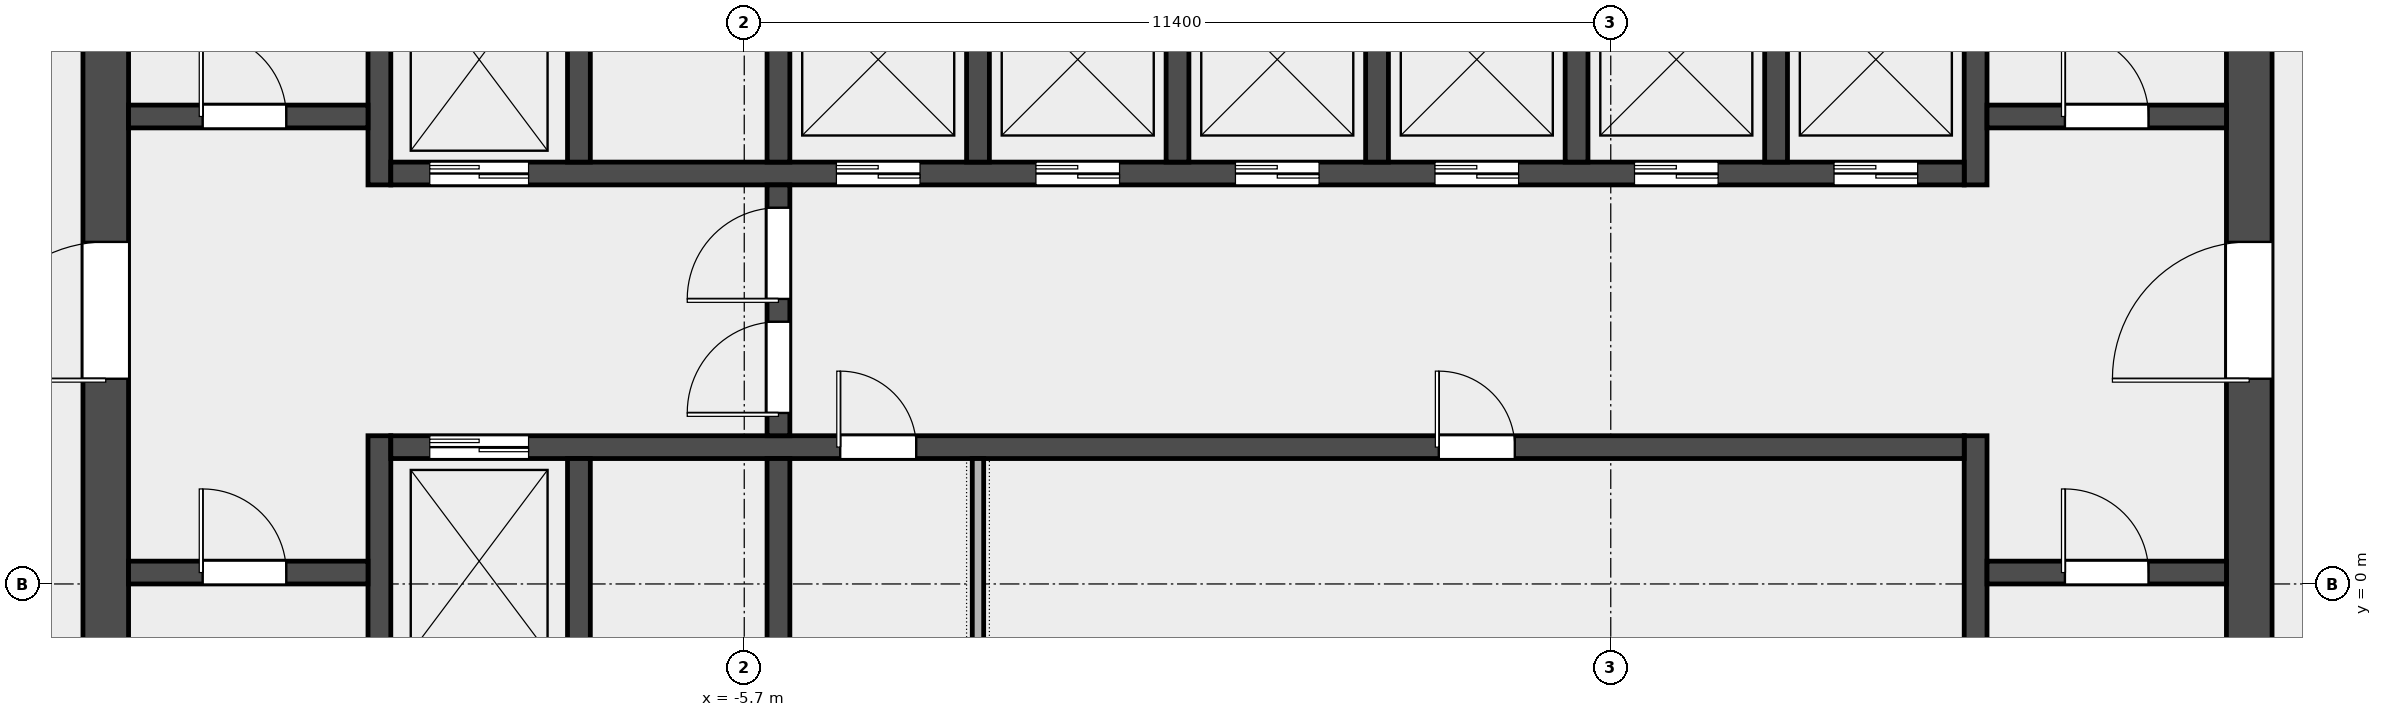
"""IFC4 building model, lengths in metres.
Left out: names, types, materials, properties, quantities, classifications, styles, units other than length and angle.
Written with IfcOpenShell. Run it as: python <this file> out.ifc"""

import sys

from ifc_helpers import new_model, si_unit, direction, frame, frame_2d, origin, place, context, subcontext, project, spatial, rectangle, extrude, element, fill, save


model = new_model("IFC4")
c1 = context("Model", 3, precision=1e-05, world=origin(), true_north=direction((0.0, 1.0)))
c2 = subcontext(c1, "Body", "Model", "MODEL_VIEW")
j1 = project(units=[si_unit("LENGTHUNIT", "METRE"), si_unit("PLANEANGLEUNIT", "RADIAN")], contexts=[c1])
p1 = place(None, origin())
s1 = spatial("IfcSite", under=j1, at=p1, CompositionType="ELEMENT")
p2 = place(p1, origin())
s2 = spatial("IfcBuilding", under=s1, at=p2, CompositionType="ELEMENT")
p3 = place(p2, frame((0.0, 0.0, 333.4)))
s3 = spatial("IfcBuildingStorey", under=s2, at=p3, CompositionType="ELEMENT", Elevation=333.4)
p4 = place(p3, frame((-14.1, -6.6, 0.0), z_axis=(0.0, 0.0, 1.0), x_axis=(0.0, 1.0, 0.0)))
e1 = element("IfcWall", 1, at=p4, inside=s3, PredefinedType="SHEAR", context=c2, shape_type="SweptSolid", body=[
    extrude(rectangle(XDim=19.5, YDim=0.6, at=frame_2d((9.75, 0.0))), origin(), (0.0, 0.0, 1.0), 3.7),
])
p5 = place(p4, frame((9.3, 0.0, 0.0)))
e2 = element("IfcOpeningElement", 2, at=p5, cuts=e1, PredefinedType="OPENING", context=c2, shape_type="SweptSolid", body=[
    extrude(rectangle(XDim=1.8, YDim=2.1, at=frame_2d((0.9, 1.05))), frame((0.0, 0.312, 0.0), z_axis=(0.0, -1.0, 0.0), x_axis=(1.0, 0.0, 0.0)), (0.0, 0.0, 1.0), 0.624),
])
p6 = place(p3, frame((14.1, -6.6, 0.0), z_axis=(0.0, 0.0, 1.0), x_axis=(0.0, 1.0, 0.0)))
e3 = element("IfcWall", 3, at=p6, inside=s3, PredefinedType="SHEAR", context=c2, shape_type="SweptSolid", body=[
    extrude(rectangle(XDim=19.5, YDim=0.6, at=frame_2d((9.75, 0.0))), origin(), (0.0, 0.0, 1.0), 3.7),
])
p7 = place(p6, frame((9.3, 0.0, 0.0)))
e4 = element("IfcOpeningElement", 4, at=p7, cuts=e3, PredefinedType="OPENING", context=c2, shape_type="SweptSolid", body=[
    extrude(rectangle(XDim=1.8, YDim=2.1, at=frame_2d((0.9, 1.05))), frame((0.0, 0.312, 0.0), z_axis=(0.0, -1.0, 0.0), x_axis=(1.0, 0.0, 0.0)), (0.0, 0.0, 1.0), 0.624),
])
p8 = place(p3, frame((-10.5, -6.6, 0.0), z_axis=(0.0, 0.0, 1.0), x_axis=(0.0, 1.0, 0.0)))
e5 = element("IfcWall", 5, at=p8, inside=s3, PredefinedType="SHEAR", context=c2, shape_type="SweptSolid", body=[
    extrude(rectangle(XDim=8.55, YDim=0.3, at=frame_2d((4.275, 0.0))), origin(), (0.0, 0.0, 1.0), 3.7),
])
p9 = place(p3, frame((-10.5, 5.25, 0.0), z_axis=(0.0, 0.0, 1.0), x_axis=(0.0, 1.0, 0.0)))
e6 = element("IfcWall", 6, at=p9, inside=s3, PredefinedType="SHEAR", context=c2, shape_type="SweptSolid", body=[
    extrude(rectangle(XDim=7.65, YDim=0.3, at=frame_2d((3.825, 0.0))), origin(), (0.0, 0.0, 1.0), 3.7),
])
p10 = place(p3, frame((10.5, -6.6, 0.0), z_axis=(0.0, 0.0, 1.0), x_axis=(0.0, 1.0, 0.0)))
e7 = element("IfcWall", 7, at=p10, inside=s3, PredefinedType="SHEAR", context=c2, shape_type="SweptSolid", body=[
    extrude(rectangle(XDim=8.55, YDim=0.3, at=frame_2d((4.275, 0.0))), origin(), (0.0, 0.0, 1.0), 3.7),
])
p11 = place(p3, frame((10.5, 5.25, 0.0), z_axis=(0.0, 0.0, 1.0), x_axis=(0.0, 1.0, 0.0)))
e8 = element("IfcWall", 8, at=p11, inside=s3, PredefinedType="SHEAR", context=c2, shape_type="SweptSolid", body=[
    extrude(rectangle(XDim=7.65, YDim=0.3, at=frame_2d((3.825, 0.0))), origin(), (0.0, 0.0, 1.0), 3.7),
])
p12 = place(p3, frame((-13.8, 0.15, 0.0), z_axis=(0.0, 0.0, 1.0), x_axis=(1.0, 0.0, 0.0)))
e9 = element("IfcWall", 9, at=p12, inside=s3, PredefinedType="SOLIDWALL", context=c2, shape_type="SweptSolid", body=[
    extrude(rectangle(XDim=3.15, YDim=0.3, at=frame_2d((1.575, 0.0))), origin(), (0.0, 0.0, 1.0), 3.7),
])
p13 = place(p12, frame((0.975, 0.0, 0.0)))
e10 = element("IfcOpeningElement", 10, at=p13, cuts=e9, PredefinedType="OPENING", context=c2, shape_type="SweptSolid", body=[
    extrude(rectangle(XDim=1.1, YDim=2.1, at=frame_2d((0.55, 1.05))), frame((0.0, 0.162, 0.0), z_axis=(0.0, -1.0, 0.0), x_axis=(1.0, 0.0, 0.0)), (0.0, 0.0, 1.0), 0.324),
])
p14 = place(p3, frame((-13.8, 6.15, 0.0), z_axis=(0.0, 0.0, 1.0), x_axis=(1.0, 0.0, 0.0)))
e11 = element("IfcWall", 11, at=p14, inside=s3, PredefinedType="SOLIDWALL", context=c2, shape_type="SweptSolid", body=[
    extrude(rectangle(XDim=3.15, YDim=0.3, at=frame_2d((1.575, 0.0))), origin(), (0.0, 0.0, 1.0), 3.7),
])
p15 = place(p14, frame((0.975, 0.0, 0.0)))
e12 = element("IfcOpeningElement", 12, at=p15, cuts=e11, PredefinedType="OPENING", context=c2, shape_type="SweptSolid", body=[
    extrude(rectangle(XDim=1.1, YDim=2.1, at=frame_2d((0.55, 1.05))), frame((0.0, 0.162, 0.0), z_axis=(0.0, -1.0, 0.0), x_axis=(1.0, 0.0, 0.0)), (0.0, 0.0, 1.0), 0.324),
])
p16 = place(p3, frame((10.65, 0.15, 0.0), z_axis=(0.0, 0.0, 1.0), x_axis=(1.0, 0.0, 0.0)))
e13 = element("IfcWall", 13, at=p16, inside=s3, PredefinedType="SOLIDWALL", context=c2, shape_type="SweptSolid", body=[
    extrude(rectangle(XDim=3.15, YDim=0.3, at=frame_2d((1.575, 0.0))), origin(), (0.0, 0.0, 1.0), 3.7),
])
p17 = place(p16, frame((1.025, 0.0, 0.0)))
e14 = element("IfcOpeningElement", 14, at=p17, cuts=e13, PredefinedType="OPENING", context=c2, shape_type="SweptSolid", body=[
    extrude(rectangle(XDim=1.1, YDim=2.1, at=frame_2d((0.55, 1.05))), frame((0.0, 0.162, 0.0), z_axis=(0.0, -1.0, 0.0), x_axis=(1.0, 0.0, 0.0)), (0.0, 0.0, 1.0), 0.324),
])
p18 = place(p3, frame((10.65, 6.15, 0.0), z_axis=(0.0, 0.0, 1.0), x_axis=(1.0, 0.0, 0.0)))
e15 = element("IfcWall", 15, at=p18, inside=s3, PredefinedType="SOLIDWALL", context=c2, shape_type="SweptSolid", body=[
    extrude(rectangle(XDim=3.15, YDim=0.3, at=frame_2d((1.575, 0.0))), origin(), (0.0, 0.0, 1.0), 3.7),
])
p19 = place(p18, frame((1.025, 0.0, 0.0)))
e16 = element("IfcOpeningElement", 16, at=p19, cuts=e15, PredefinedType="OPENING", context=c2, shape_type="SweptSolid", body=[
    extrude(rectangle(XDim=1.1, YDim=2.1, at=frame_2d((0.55, 1.05))), frame((0.0, 0.162, 0.0), z_axis=(0.0, -1.0, 0.0), x_axis=(1.0, 0.0, 0.0)), (0.0, 0.0, 1.0), 0.324),
])
p20 = place(p3, frame((-10.35, 1.8, 0.0), z_axis=(0.0, 0.0, 1.0), x_axis=(1.0, 0.0, 0.0)))
e17 = element("IfcWall", 17, at=p20, inside=s3, PredefinedType="SOLIDWALL", context=c2, shape_type="SweptSolid", body=[
    extrude(rectangle(XDim=20.7, YDim=0.3, at=frame_2d((10.35, 0.0))), origin(), (0.0, 0.0, 1.0), 3.7),
])
p21 = place(p20, frame((0.512, 0.0, 0.0)))
e18 = element("IfcOpeningElement", 18, at=p21, cuts=e17, PredefinedType="OPENING", context=c2, shape_type="SweptSolid", body=[
    extrude(rectangle(XDim=1.3, YDim=2.1, at=frame_2d((0.65, 1.05))), frame((0.0, 0.162, 0.0), z_axis=(0.0, -1.0, 0.0), x_axis=(1.0, 0.0, 0.0)), (0.0, 0.0, 1.0), 0.324),
])
p22 = place(p20, frame((5.913, 0.0, 0.0)))
e19 = element("IfcOpeningElement", 19, at=p22, cuts=e17, PredefinedType="OPENING", context=c2, shape_type="SweptSolid", body=[
    extrude(rectangle(XDim=1.0, YDim=2.1, at=frame_2d((0.5, 1.05))), frame((0.0, 0.162, 0.0), z_axis=(0.0, -1.0, 0.0), x_axis=(1.0, 0.0, 0.0)), (0.0, 0.0, 1.0), 0.324),
])
p23 = place(p20, frame((13.788, 0.0, 0.0)))
e20 = element("IfcOpeningElement", 20, at=p23, cuts=e17, PredefinedType="OPENING", context=c2, shape_type="SweptSolid", body=[
    extrude(rectangle(XDim=1.0, YDim=2.1, at=frame_2d((0.5, 1.05))), frame((0.0, 0.162, 0.0), z_axis=(0.0, -1.0, 0.0), x_axis=(1.0, 0.0, 0.0)), (0.0, 0.0, 1.0), 0.324),
])
p24 = place(p3, frame((-10.35, 5.4, 0.0), z_axis=(0.0, 0.0, 1.0), x_axis=(1.0, 0.0, 0.0)))
e21 = element("IfcWall", 21, at=p24, inside=s3, PredefinedType="SOLIDWALL", context=c2, shape_type="SweptSolid", body=[
    extrude(rectangle(XDim=20.7, YDim=0.3, at=frame_2d((10.35, 0.0))), origin(), (0.0, 0.0, 1.0), 3.7),
])
p25 = place(p24, frame((0.512, 0.0, 0.0)))
e22 = element("IfcOpeningElement", 22, at=p25, cuts=e21, PredefinedType="OPENING", context=c2, shape_type="SweptSolid", body=[
    extrude(rectangle(XDim=1.3, YDim=2.1, at=frame_2d((0.65, 1.05))), frame((0.0, 0.162, 0.0), z_axis=(0.0, -1.0, 0.0), x_axis=(1.0, 0.0, 0.0)), (0.0, 0.0, 1.0), 0.324),
])
p26 = place(p24, frame((5.863, 0.0, 0.0)))
e23 = element("IfcOpeningElement", 23, at=p26, cuts=e21, PredefinedType="OPENING", context=c2, shape_type="SweptSolid", body=[
    extrude(rectangle(XDim=1.1, YDim=2.1, at=frame_2d((0.55, 1.05))), frame((0.0, 0.162, 0.0), z_axis=(0.0, -1.0, 0.0), x_axis=(1.0, 0.0, 0.0)), (0.0, 0.0, 1.0), 0.324),
])
p27 = place(p24, frame((8.488, 0.0, 0.0)))
e24 = element("IfcOpeningElement", 24, at=p27, cuts=e21, PredefinedType="OPENING", context=c2, shape_type="SweptSolid", body=[
    extrude(rectangle(XDim=1.1, YDim=2.1, at=frame_2d((0.55, 1.05))), frame((0.0, 0.162, 0.0), z_axis=(0.0, -1.0, 0.0), x_axis=(1.0, 0.0, 0.0)), (0.0, 0.0, 1.0), 0.324),
])
p28 = place(p24, frame((11.113, 0.0, 0.0)))
e25 = element("IfcOpeningElement", 25, at=p28, cuts=e21, PredefinedType="OPENING", context=c2, shape_type="SweptSolid", body=[
    extrude(rectangle(XDim=1.1, YDim=2.1, at=frame_2d((0.55, 1.05))), frame((0.0, 0.162, 0.0), z_axis=(0.0, -1.0, 0.0), x_axis=(1.0, 0.0, 0.0)), (0.0, 0.0, 1.0), 0.324),
])
p29 = place(p24, frame((13.738, 0.0, 0.0)))
e26 = element("IfcOpeningElement", 26, at=p29, cuts=e21, PredefinedType="OPENING", context=c2, shape_type="SweptSolid", body=[
    extrude(rectangle(XDim=1.1, YDim=2.1, at=frame_2d((0.55, 1.05))), frame((0.0, 0.162, 0.0), z_axis=(0.0, -1.0, 0.0), x_axis=(1.0, 0.0, 0.0)), (0.0, 0.0, 1.0), 0.324),
])
p30 = place(p24, frame((16.363, 0.0, 0.0)))
e27 = element("IfcOpeningElement", 27, at=p30, cuts=e21, PredefinedType="OPENING", context=c2, shape_type="SweptSolid", body=[
    extrude(rectangle(XDim=1.1, YDim=2.1, at=frame_2d((0.55, 1.05))), frame((0.0, 0.162, 0.0), z_axis=(0.0, -1.0, 0.0), x_axis=(1.0, 0.0, 0.0)), (0.0, 0.0, 1.0), 0.324),
])
p31 = place(p24, frame((18.988, 0.0, 0.0)))
e28 = element("IfcOpeningElement", 28, at=p31, cuts=e21, PredefinedType="OPENING", context=c2, shape_type="SweptSolid", body=[
    extrude(rectangle(XDim=1.1, YDim=2.1, at=frame_2d((0.55, 1.05))), frame((0.0, 0.162, 0.0), z_axis=(0.0, -1.0, 0.0), x_axis=(1.0, 0.0, 0.0)), (0.0, 0.0, 1.0), 0.324),
])
for number, where, z_axis, x_axis in (
    (29, (-7.875, -1.05, 0.0), (0.0, 0.0, 1.0), (0.0, 1.0, 0.0)),
    (30, (-5.25, -1.05, 0.0), (0.0, 0.0, 1.0), (0.0, 1.0, 0.0)),
    (31, (-7.875, 5.55, 0.0), (0.0, 0.0, 1.0), (0.0, 1.0, 0.0)),
    (32, (-5.25, 5.55, 0.0), (0.0, 0.0, 1.0), (0.0, 1.0, 0.0)),
    (33, (-2.625, 5.55, 0.0), (0.0, 0.0, 1.0), (0.0, 1.0, 0.0)),
    (34, (0.0, 5.55, 0.0), (0.0, 0.0, 1.0), (0.0, 1.0, 0.0)),
    (35, (2.625, 5.55, 0.0), (0.0, 0.0, 1.0), (0.0, 1.0, 0.0)),
    (36, (5.25, 5.55, 0.0), (0.0, 0.0, 1.0), (0.0, 1.0, 0.0)),
    (37, (7.875, 5.55, 0.0), (0.0, 0.0, 1.0), (0.0, 1.0, 0.0)),
):
    element("IfcWall", number, at=place(p3, frame(where, z_axis=z_axis, x_axis=x_axis)), inside=s3, PredefinedType="SOLIDWALL", context=c2, shape_type="SweptSolid", body=[
        extrude(rectangle(XDim=2.7, YDim=0.3, at=frame_2d((1.35, 0.0))), origin(), (0.0, 0.0, 1.0), 3.7),
    ])
p32 = place(p3, frame((-5.25, 1.95, 0.0), z_axis=(0.0, 0.0, 1.0), x_axis=(0.0, 1.0, 0.0)))
e38 = element("IfcWall", 38, at=p32, inside=s3, PredefinedType="SOLIDWALL", context=c2, shape_type="SweptSolid", body=[
    extrude(rectangle(XDim=3.3, YDim=0.3, at=frame_2d((1.65, 0.0))), origin(), (0.0, 0.0, 1.0), 3.7),
])
p33 = place(p32, frame((0.3, 0.0, 0.0)))
e39 = element("IfcOpeningElement", 39, at=p33, cuts=e38, PredefinedType="OPENING", context=c2, shape_type="SweptSolid", body=[
    extrude(rectangle(XDim=1.2, YDim=2.1, at=frame_2d((0.6, 1.05))), frame((0.0, 0.162, 0.0), z_axis=(0.0, -1.0, 0.0), x_axis=(1.0, 0.0, 0.0)), (0.0, 0.0, 1.0), 0.324),
])
p34 = place(p32, frame((1.8, 0.0, 0.0)))
e40 = element("IfcOpeningElement", 40, at=p34, cuts=e38, PredefinedType="OPENING", context=c2, shape_type="SweptSolid", body=[
    extrude(rectangle(XDim=1.2, YDim=2.1, at=frame_2d((0.6, 1.05))), frame((0.0, 0.162, 0.0), z_axis=(0.0, -1.0, 0.0), x_axis=(1.0, 0.0, 0.0)), (0.0, 0.0, 1.0), 0.324),
])
p35 = place(p3, frame((-2.625, -1.05, 0.0), z_axis=(0.0, 0.0, 1.0), x_axis=(0.0, 1.0, 0.0)))
e41 = element("IfcWall", 41, at=p35, inside=s3, PredefinedType="PARTITIONING", context=c2, shape_type="SweptSolid", body=[
    extrude(rectangle(XDim=2.7, YDim=0.15, at=frame_2d((1.35, 0.0))), origin(), (0.0, 0.0, 1.0), 3.7),
])
p36 = place(p13, origin())
e42 = element("IfcDoor", 42, at=p36, inside=s3, OperationType="SINGLE_SWING_LEFT", PredefinedType="DOOR", context=c2, shape_type="SweptSolid", body=[
    extrude(rectangle(XDim=1.1, YDim=2.1, at=frame_2d((0.55, 1.05))), frame((0.0, 0.025, 0.0), z_axis=(0.0, -1.0, 0.0), x_axis=(1.0, 0.0, 0.0)), (0.0, 0.0, 1.0), 0.05),
])
fill(e10, e42)
p37 = place(p15, origin())
e43 = element("IfcDoor", 43, at=p37, inside=s3, OperationType="SINGLE_SWING_LEFT", PredefinedType="DOOR", context=c2, shape_type="SweptSolid", body=[
    extrude(rectangle(XDim=1.1, YDim=2.1, at=frame_2d((0.55, 1.05))), frame((0.0, 0.025, 0.0), z_axis=(0.0, -1.0, 0.0), x_axis=(1.0, 0.0, 0.0)), (0.0, 0.0, 1.0), 0.05),
])
fill(e12, e43)
p38 = place(p17, origin())
e44 = element("IfcDoor", 44, at=p38, inside=s3, OperationType="SINGLE_SWING_RIGHT", PredefinedType="DOOR", context=c2, shape_type="SweptSolid", body=[
    extrude(rectangle(XDim=1.1, YDim=2.1, at=frame_2d((0.55, 1.05))), frame((0.0, 0.025, 0.0), z_axis=(0.0, -1.0, 0.0), x_axis=(1.0, 0.0, 0.0)), (0.0, 0.0, 1.0), 0.05),
])
fill(e14, e44)
p39 = place(p19, origin())
e45 = element("IfcDoor", 45, at=p39, inside=s3, OperationType="SINGLE_SWING_RIGHT", PredefinedType="DOOR", context=c2, shape_type="SweptSolid", body=[
    extrude(rectangle(XDim=1.1, YDim=2.1, at=frame_2d((0.55, 1.05))), frame((0.0, 0.025, 0.0), z_axis=(0.0, -1.0, 0.0), x_axis=(1.0, 0.0, 0.0)), (0.0, 0.0, 1.0), 0.05),
])
fill(e16, e45)
p40 = place(p5, origin())
e46 = element("IfcDoor", 46, at=p40, inside=s3, OperationType="DOUBLE_DOOR_SINGLE_SWING", PredefinedType="DOOR", context=c2, shape_type="SweptSolid", body=[
    extrude(rectangle(XDim=1.8, YDim=2.1, at=frame_2d((0.9, 1.05))), frame((0.0, 0.025, 0.0), z_axis=(0.0, -1.0, 0.0), x_axis=(1.0, 0.0, 0.0)), (0.0, 0.0, 1.0), 0.05),
])
fill(e2, e46)
p41 = place(p7, origin())
e47 = element("IfcDoor", 47, at=p41, inside=s3, OperationType="DOUBLE_DOOR_SINGLE_SWING", PredefinedType="DOOR", context=c2, shape_type="SweptSolid", body=[
    extrude(rectangle(XDim=1.8, YDim=2.1, at=frame_2d((0.9, 1.05))), frame((0.0, 0.025, 0.0), z_axis=(0.0, -1.0, 0.0), x_axis=(1.0, 0.0, 0.0)), (0.0, 0.0, 1.0), 0.05),
])
fill(e4, e47)
p42 = place(p33, origin())
e48 = element("IfcDoor", 48, at=p42, inside=s3, OperationType="SINGLE_SWING_LEFT", PredefinedType="DOOR", context=c2, shape_type="SweptSolid", body=[
    extrude(rectangle(XDim=1.2, YDim=2.1, at=frame_2d((0.6, 1.05))), frame((0.0, 0.025, 0.0), z_axis=(0.0, -1.0, 0.0), x_axis=(1.0, 0.0, 0.0)), (0.0, 0.0, 1.0), 0.05),
])
fill(e39, e48)
p43 = place(p34, origin())
e49 = element("IfcDoor", 49, at=p43, inside=s3, OperationType="SINGLE_SWING_RIGHT", PredefinedType="DOOR", context=c2, shape_type="SweptSolid", body=[
    extrude(rectangle(XDim=1.2, YDim=2.1, at=frame_2d((0.6, 1.05))), frame((0.0, 0.025, 0.0), z_axis=(0.0, -1.0, 0.0), x_axis=(1.0, 0.0, 0.0)), (0.0, 0.0, 1.0), 0.05),
])
fill(e40, e49)
p44 = place(p21, origin())
e50 = element("IfcDoor", 50, at=p44, inside=s3, OperationType="DOUBLE_DOOR_SLIDING", PredefinedType="DOOR", context=c2, shape_type="SweptSolid", body=[
    extrude(rectangle(XDim=1.3, YDim=2.1, at=frame_2d((0.65, 1.05))), frame((0.0, 0.025, 0.0), z_axis=(0.0, -1.0, 0.0), x_axis=(1.0, 0.0, 0.0)), (0.0, 0.0, 1.0), 0.05),
])
fill(e18, e50)
p45 = place(p25, origin())
e51 = element("IfcDoor", 51, at=p45, inside=s3, OperationType="DOUBLE_DOOR_SLIDING", PredefinedType="DOOR", context=c2, shape_type="SweptSolid", body=[
    extrude(rectangle(XDim=1.3, YDim=2.1, at=frame_2d((0.65, 1.05))), frame((0.0, 0.025, 0.0), z_axis=(0.0, -1.0, 0.0), x_axis=(1.0, 0.0, 0.0)), (0.0, 0.0, 1.0), 0.05),
])
fill(e22, e51)
p46 = place(p26, origin())
e52 = element("IfcDoor", 52, at=p46, inside=s3, OperationType="DOUBLE_DOOR_SLIDING", PredefinedType="DOOR", context=c2, shape_type="SweptSolid", body=[
    extrude(rectangle(XDim=1.1, YDim=2.1, at=frame_2d((0.55, 1.05))), frame((0.0, 0.025, 0.0), z_axis=(0.0, -1.0, 0.0), x_axis=(1.0, 0.0, 0.0)), (0.0, 0.0, 1.0), 0.05),
])
fill(e23, e52)
p47 = place(p27, origin())
e53 = element("IfcDoor", 53, at=p47, inside=s3, OperationType="DOUBLE_DOOR_SLIDING", PredefinedType="DOOR", context=c2, shape_type="SweptSolid", body=[
    extrude(rectangle(XDim=1.1, YDim=2.1, at=frame_2d((0.55, 1.05))), frame((0.0, 0.025, 0.0), z_axis=(0.0, -1.0, 0.0), x_axis=(1.0, 0.0, 0.0)), (0.0, 0.0, 1.0), 0.05),
])
fill(e24, e53)
p48 = place(p28, origin())
e54 = element("IfcDoor", 54, at=p48, inside=s3, OperationType="DOUBLE_DOOR_SLIDING", PredefinedType="DOOR", context=c2, shape_type="SweptSolid", body=[
    extrude(rectangle(XDim=1.1, YDim=2.1, at=frame_2d((0.55, 1.05))), frame((0.0, 0.025, 0.0), z_axis=(0.0, -1.0, 0.0), x_axis=(1.0, 0.0, 0.0)), (0.0, 0.0, 1.0), 0.05),
])
fill(e25, e54)
p49 = place(p29, origin())
e55 = element("IfcDoor", 55, at=p49, inside=s3, OperationType="DOUBLE_DOOR_SLIDING", PredefinedType="DOOR", context=c2, shape_type="SweptSolid", body=[
    extrude(rectangle(XDim=1.1, YDim=2.1, at=frame_2d((0.55, 1.05))), frame((0.0, 0.025, 0.0), z_axis=(0.0, -1.0, 0.0), x_axis=(1.0, 0.0, 0.0)), (0.0, 0.0, 1.0), 0.05),
])
fill(e26, e55)
p50 = place(p30, origin())
e56 = element("IfcDoor", 56, at=p50, inside=s3, OperationType="DOUBLE_DOOR_SLIDING", PredefinedType="DOOR", context=c2, shape_type="SweptSolid", body=[
    extrude(rectangle(XDim=1.1, YDim=2.1, at=frame_2d((0.55, 1.05))), frame((0.0, 0.025, 0.0), z_axis=(0.0, -1.0, 0.0), x_axis=(1.0, 0.0, 0.0)), (0.0, 0.0, 1.0), 0.05),
])
fill(e27, e56)
p51 = place(p31, origin())
e57 = element("IfcDoor", 57, at=p51, inside=s3, OperationType="DOUBLE_DOOR_SLIDING", PredefinedType="DOOR", context=c2, shape_type="SweptSolid", body=[
    extrude(rectangle(XDim=1.1, YDim=2.1, at=frame_2d((0.55, 1.05))), frame((0.0, 0.025, 0.0), z_axis=(0.0, -1.0, 0.0), x_axis=(1.0, 0.0, 0.0)), (0.0, 0.0, 1.0), 0.05),
])
fill(e28, e57)
p52 = place(p22, origin())
e58 = element("IfcDoor", 58, at=p52, inside=s3, OperationType="SINGLE_SWING_LEFT", PredefinedType="DOOR", context=c2, shape_type="SweptSolid", body=[
    extrude(rectangle(XDim=1.0, YDim=2.1, at=frame_2d((0.5, 1.05))), frame((0.0, 0.025, 0.0), z_axis=(0.0, -1.0, 0.0), x_axis=(1.0, 0.0, 0.0)), (0.0, 0.0, 1.0), 0.05),
])
fill(e19, e58)
p53 = place(p23, origin())
e59 = element("IfcDoor", 59, at=p53, inside=s3, OperationType="SINGLE_SWING_LEFT", PredefinedType="DOOR", context=c2, shape_type="SweptSolid", body=[
    extrude(rectangle(XDim=1.0, YDim=2.1, at=frame_2d((0.5, 1.05))), frame((0.0, 0.025, 0.0), z_axis=(0.0, -1.0, 0.0), x_axis=(1.0, 0.0, 0.0)), (0.0, 0.0, 1.0), 0.05),
])
fill(e20, e59)
save(model, sys.argv[1])
